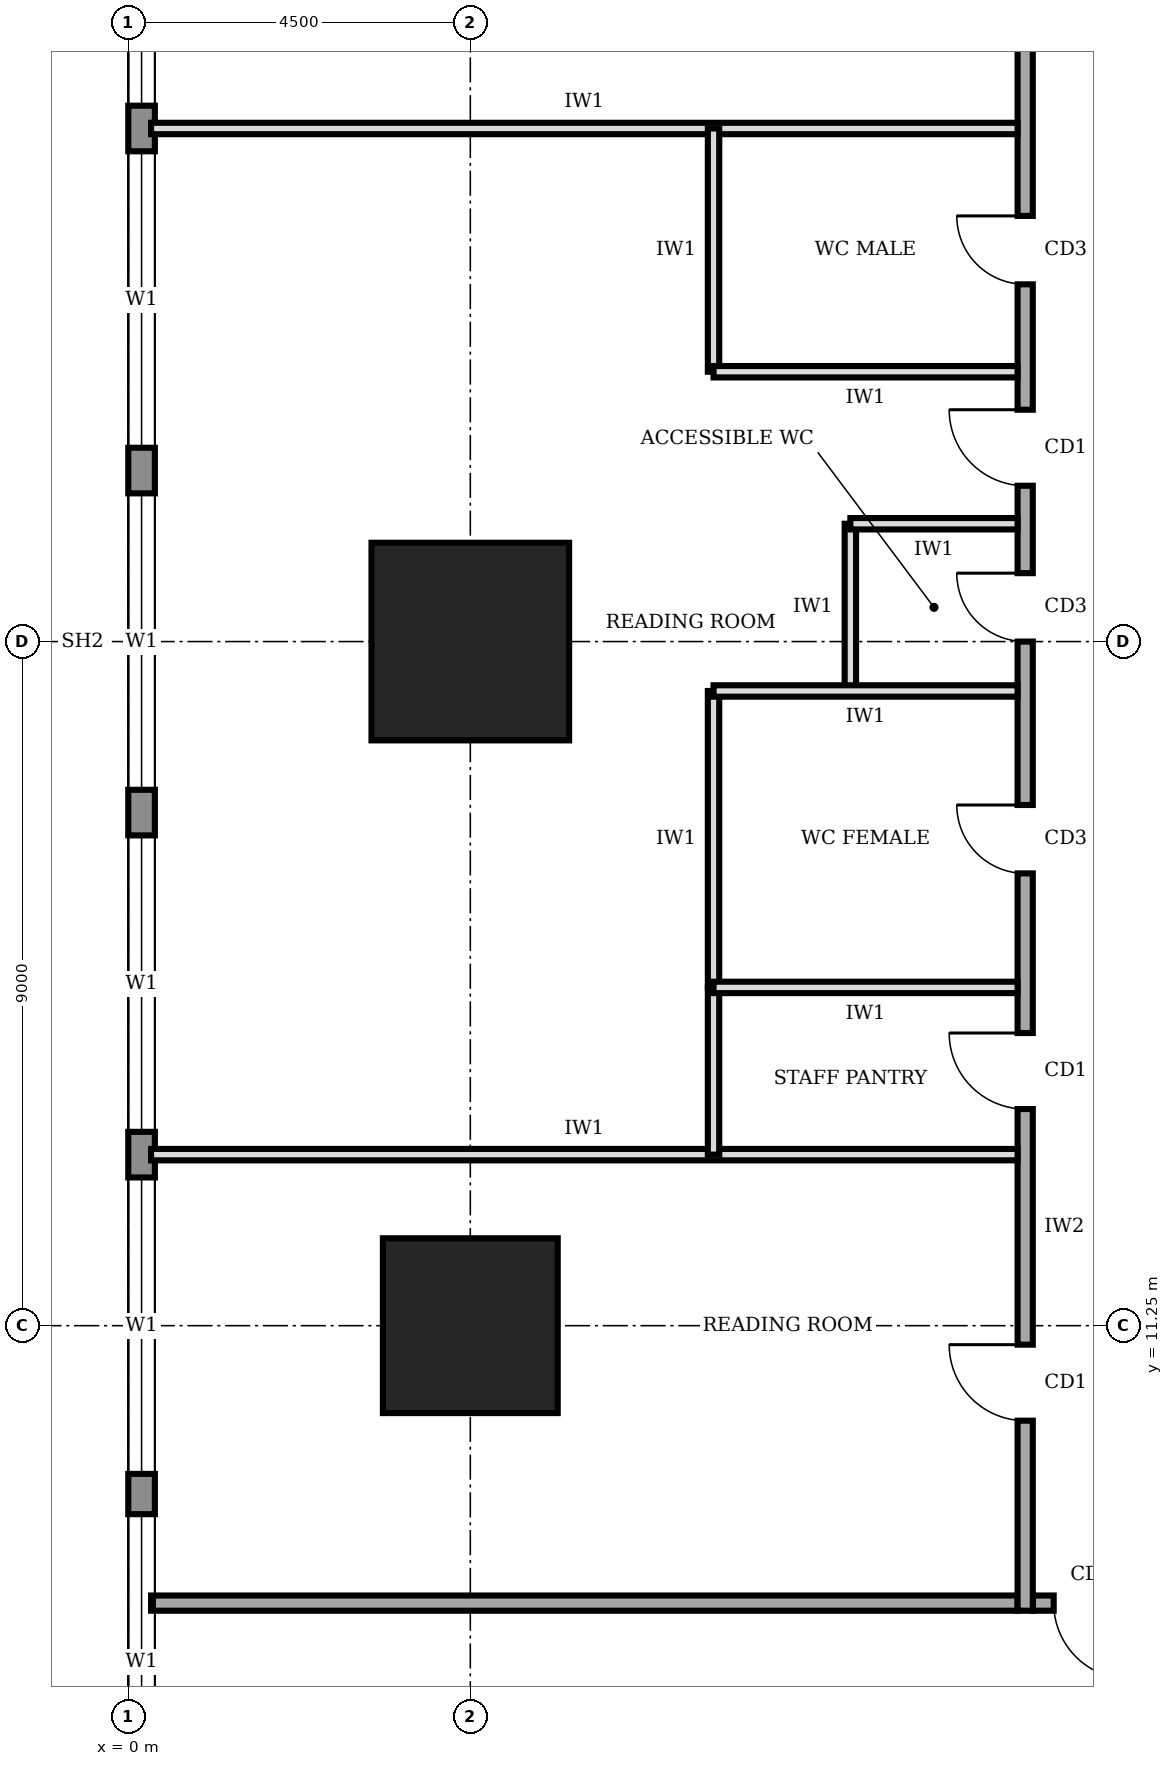
"""IFC4 building model, lengths in metres.
Left out: names, types, materials, properties, quantities, classifications, styles, units other than length and angle.
Written with IfcOpenShell. Run it as: python <this file> out.ifc"""

import sys

from ifc_helpers import new_model, si_unit, direction, frame, frame_2d, origin, origin_2d, place, context, subcontext, project, spatial, rectangle, extrude, element, fill, save


model = new_model("IFC4")
c1 = context("Model", 3, precision=1e-05, world=origin(), true_north=direction((0.0, 1.0)))
c2 = subcontext(c1, "Body", "Model", "MODEL_VIEW")
j1 = project(units=[si_unit("LENGTHUNIT", "METRE"), si_unit("PLANEANGLEUNIT", "RADIAN")], contexts=[c1])
p1 = place(None, origin())
s1 = spatial("IfcSite", under=j1, at=p1, CompositionType="ELEMENT")
p2 = place(p1, origin())
s2 = spatial("IfcBuilding", under=s1, at=p2, CompositionType="ELEMENT")
p3 = place(p2, frame((0.0, 0.0, 129.0)))
s3 = spatial("IfcBuildingStorey", under=s2, at=p3, CompositionType="ELEMENT", Elevation=129.0)
p4 = place(p3, frame((4.5, 11.25, 0.0), z_axis=(0.0, 0.0, 1.0), x_axis=(1.0, 0.0, 0.0)))
e1 = element("IfcColumn", 1, at=p4, inside=s3, PredefinedType="COLUMN", context=c2, shape_type="SweptSolid", body=[
    extrude(rectangle(XDim=2.3, YDim=2.3, at=origin_2d()), origin(), (0.0, 0.0, 1.0), 4.0),
])
p5 = place(p3, frame((4.5, 20.25, 0.0), z_axis=(0.0, 0.0, 1.0), x_axis=(1.0, 0.0, 0.0)))
e2 = element("IfcColumn", 2, at=p5, inside=s3, PredefinedType="COLUMN", context=c2, shape_type="SweptSolid", body=[
    extrude(rectangle(XDim=2.6, YDim=2.6, at=origin_2d()), origin(), (0.0, 0.0, 1.0), 4.0),
])
p6 = place(p3, frame((0.175, 35.98, 0.0), z_axis=(0.0, 0.0, 1.0), x_axis=(0.0, -1.0, 0.0)))
e3 = element("IfcWall", 3, at=p6, inside=s3, PredefinedType="STANDARD", context=c2, shape_type="SweptSolid", body=[
    extrude(rectangle(XDim=31.46, YDim=0.35, at=frame_2d((15.73, 0.0))), origin(), (0.0, 0.0, 1.0), 3.75),
])
p7 = place(p6, frame((27.21, 0.0, 0.9)))
e4 = element("IfcOpeningElement", 4, at=p7, cuts=e3, PredefinedType="OPENING", context=c2, shape_type="SweptSolid", body=[
    extrude(rectangle(XDim=3.9, YDim=2.2, at=frame_2d((1.95, 1.1))), frame((0.0, 0.185, 0.0), z_axis=(0.0, -1.0, 0.0), x_axis=(1.0, 0.0, 0.0)), (0.0, 0.0, 1.0), 0.37),
])
p8 = place(p6, frame((22.78, 0.0, 0.9)))
e5 = element("IfcOpeningElement", 5, at=p8, cuts=e3, PredefinedType="OPENING", context=c2, shape_type="SweptSolid", body=[
    extrude(rectangle(XDim=3.9, YDim=2.2, at=frame_2d((1.95, 1.1))), frame((0.0, 0.185, 0.0), z_axis=(0.0, -1.0, 0.0), x_axis=(1.0, 0.0, 0.0)), (0.0, 0.0, 1.0), 0.37),
])
p9 = place(p6, frame((18.28, 0.0, 0.9)))
e6 = element("IfcOpeningElement", 6, at=p9, cuts=e3, PredefinedType="OPENING", context=c2, shape_type="SweptSolid", body=[
    extrude(rectangle(XDim=3.9, YDim=2.2, at=frame_2d((1.95, 1.1))), frame((0.0, 0.185, 0.0), z_axis=(0.0, -1.0, 0.0), x_axis=(1.0, 0.0, 0.0)), (0.0, 0.0, 1.0), 0.37),
])
p10 = place(p6, frame((13.78, 0.0, 0.9)))
e7 = element("IfcOpeningElement", 7, at=p10, cuts=e3, PredefinedType="OPENING", context=c2, shape_type="SweptSolid", body=[
    extrude(rectangle(XDim=3.9, YDim=2.2, at=frame_2d((1.95, 1.1))), frame((0.0, 0.185, 0.0), z_axis=(0.0, -1.0, 0.0), x_axis=(1.0, 0.0, 0.0)), (0.0, 0.0, 1.0), 0.37),
])
p11 = place(p6, frame((9.28, 0.0, 0.9)))
e8 = element("IfcOpeningElement", 8, at=p11, cuts=e3, PredefinedType="OPENING", context=c2, shape_type="SweptSolid", body=[
    extrude(rectangle(XDim=3.9, YDim=2.2, at=frame_2d((1.95, 1.1))), frame((0.0, 0.185, 0.0), z_axis=(0.0, -1.0, 0.0), x_axis=(1.0, 0.0, 0.0)), (0.0, 0.0, 1.0), 0.37),
])
p12 = place(p6, frame((4.78, 0.0, 0.9)))
e9 = element("IfcOpeningElement", 9, at=p12, cuts=e3, PredefinedType="OPENING", context=c2, shape_type="SweptSolid", body=[
    extrude(rectangle(XDim=3.9, YDim=2.2, at=frame_2d((1.95, 1.1))), frame((0.0, 0.185, 0.0), z_axis=(0.0, -1.0, 0.0), x_axis=(1.0, 0.0, 0.0)), (0.0, 0.0, 1.0), 0.37),
])
p13 = place(p3, frame((11.9, 7.6, 0.0), z_axis=(0.0, 0.0, 1.0), x_axis=(1.0, 0.0, 0.0)))
e10 = element("IfcWall", 10, at=p13, inside=s3, PredefinedType="SOLIDWALL", context=c2, shape_type="SweptSolid", body=[
    extrude(rectangle(XDim=16.9, YDim=0.2, at=frame_2d((8.45, 0.0))), origin(), (0.0, 0.0, 1.0), 3.75),
])
p14 = place(p13, frame((0.275, 0.0, 0.0)))
e11 = element("IfcOpeningElement", 11, at=p14, cuts=e10, PredefinedType="OPENING", context=c2, shape_type="SweptSolid", body=[
    extrude(rectangle(XDim=1.0, YDim=2.1, at=frame_2d((0.5, 1.05))), frame((0.0, 0.11, 0.0), z_axis=(0.0, -1.0, 0.0), x_axis=(1.0, 0.0, 0.0)), (0.0, 0.0, 1.0), 0.22),
])
p15 = place(p13, frame((3.35, 0.0, 0.0)))
e12 = element("IfcOpeningElement", 12, at=p15, cuts=e10, PredefinedType="OPENING", context=c2, shape_type="SweptSolid", body=[
    extrude(rectangle(XDim=1.0, YDim=2.1, at=frame_2d((0.5, 1.05))), frame((0.0, 0.11, 0.0), z_axis=(0.0, -1.0, 0.0), x_axis=(1.0, 0.0, 0.0)), (0.0, 0.0, 1.0), 0.22),
])
p16 = place(p13, frame((10.1, 0.0, 0.0)))
e13 = element("IfcOpeningElement", 13, at=p16, cuts=e10, PredefinedType="OPENING", context=c2, shape_type="SweptSolid", body=[
    extrude(rectangle(XDim=1.0, YDim=2.1, at=frame_2d((0.5, 1.05))), frame((0.0, 0.11, 0.0), z_axis=(0.0, -1.0, 0.0), x_axis=(1.0, 0.0, 0.0)), (0.0, 0.0, 1.0), 0.22),
])
p17 = place(p13, frame((15.425, 0.0, 0.0)))
e14 = element("IfcOpeningElement", 14, at=p17, cuts=e10, PredefinedType="OPENING", context=c2, shape_type="SweptSolid", body=[
    extrude(rectangle(XDim=1.0, YDim=2.1, at=frame_2d((0.5, 1.05))), frame((0.0, 0.11, 0.0), z_axis=(0.0, -1.0, 0.0), x_axis=(1.0, 0.0, 0.0)), (0.0, 0.0, 1.0), 0.22),
])
p18 = place(p3, frame((11.8, 31.3, 0.0), z_axis=(0.0, 0.0, 1.0), x_axis=(0.0, -1.0, 0.0)))
e15 = element("IfcWall", 15, at=p18, inside=s3, PredefinedType="SOLIDWALL", context=c2, shape_type="SweptSolid", body=[
    extrude(rectangle(XDim=23.8, YDim=0.2, at=frame_2d((11.9, 0.0))), origin(), (0.0, 0.0, 1.0), 3.75),
])
p19 = place(p18, frame((20.3, 0.0, 0.0)))
e16 = element("IfcOpeningElement", 16, at=p19, cuts=e15, PredefinedType="OPENING", context=c2, shape_type="SweptSolid", body=[
    extrude(rectangle(XDim=1.0, YDim=2.1, at=frame_2d((0.5, 1.05))), frame((0.0, 0.11, 0.0), z_axis=(0.0, -1.0, 0.0), x_axis=(1.0, 0.0, 0.0)), (0.0, 0.0, 1.0), 0.22),
])
p20 = place(p18, frame((16.2, 0.0, 0.0)))
e17 = element("IfcOpeningElement", 17, at=p20, cuts=e15, PredefinedType="OPENING", context=c2, shape_type="SweptSolid", body=[
    extrude(rectangle(XDim=1.0, YDim=2.1, at=frame_2d((0.5, 1.05))), frame((0.0, 0.11, 0.0), z_axis=(0.0, -1.0, 0.0), x_axis=(1.0, 0.0, 0.0)), (0.0, 0.0, 1.0), 0.22),
])
p21 = place(p18, frame((13.2, 0.0, 0.0)))
e18 = element("IfcOpeningElement", 18, at=p21, cuts=e15, PredefinedType="OPENING", context=c2, shape_type="SweptSolid", body=[
    extrude(rectangle(XDim=0.9, YDim=2.1, at=frame_2d((0.45, 1.05))), frame((0.0, 0.11, 0.0), z_axis=(0.0, -1.0, 0.0), x_axis=(1.0, 0.0, 0.0)), (0.0, 0.0, 1.0), 0.22),
])
p22 = place(p18, frame((10.15, 0.0, 0.0)))
e19 = element("IfcOpeningElement", 19, at=p22, cuts=e15, PredefinedType="OPENING", context=c2, shape_type="SweptSolid", body=[
    extrude(rectangle(XDim=0.9, YDim=2.1, at=frame_2d((0.45, 1.05))), frame((0.0, 0.11, 0.0), z_axis=(0.0, -1.0, 0.0), x_axis=(1.0, 0.0, 0.0)), (0.0, 0.0, 1.0), 0.22),
])
p23 = place(p18, frame((5.45, 0.0, 0.0)))
e20 = element("IfcOpeningElement", 20, at=p23, cuts=e15, PredefinedType="OPENING", context=c2, shape_type="SweptSolid", body=[
    extrude(rectangle(XDim=0.9, YDim=2.1, at=frame_2d((0.45, 1.05))), frame((0.0, 0.11, 0.0), z_axis=(0.0, -1.0, 0.0), x_axis=(1.0, 0.0, 0.0)), (0.0, 0.0, 1.0), 0.22),
])
p24 = place(p18, frame((8.0, 0.0, 0.0)))
e21 = element("IfcOpeningElement", 21, at=p24, cuts=e15, PredefinedType="OPENING", context=c2, shape_type="SweptSolid", body=[
    extrude(rectangle(XDim=1.0, YDim=2.1, at=frame_2d((0.5, 1.05))), frame((0.0, 0.11, 0.0), z_axis=(0.0, -1.0, 0.0), x_axis=(1.0, 0.0, 0.0)), (0.0, 0.0, 1.0), 0.22),
])
p25 = place(p18, frame((1.55, 0.0, 0.0)))
e22 = element("IfcOpeningElement", 22, at=p25, cuts=e15, PredefinedType="OPENING", context=c2, shape_type="SweptSolid", body=[
    extrude(rectangle(XDim=1.0, YDim=2.1, at=frame_2d((0.5, 1.05))), frame((0.0, 0.11, 0.0), z_axis=(0.0, -1.0, 0.0), x_axis=(1.0, 0.0, 0.0)), (0.0, 0.0, 1.0), 0.22),
])
p26 = place(p3, frame((0.3, 7.6, 0.0), z_axis=(0.0, 0.0, 1.0), x_axis=(1.0, 0.0, 0.0)))
e23 = element("IfcWall", 23, at=p26, inside=s3, PredefinedType="SOLIDWALL", context=c2, shape_type="SweptSolid", body=[
    extrude(rectangle(XDim=11.4, YDim=0.2, at=frame_2d((5.7, 0.0))), origin(), (0.0, 0.0, 1.0), 3.75),
])
for number, where, z_axis, x_axis in (
    (24, (0.3, 13.5, 0.0), (0.0, 0.0, 1.0), (1.0, 0.0, 0.0)),
    (25, (0.3, 27.0, 0.0), (0.0, 0.0, 1.0), (1.0, 0.0, 0.0)),
):
    element("IfcWall", number, at=place(p3, frame(where, z_axis=z_axis, x_axis=x_axis)), inside=s3, PredefinedType="PARTITIONING", context=c2, shape_type="SweptSolid", body=[
        extrude(rectangle(XDim=11.4, YDim=0.15, at=frame_2d((5.7, 0.0))), origin(), (0.0, 0.0, 1.0), 3.75),
    ])
p27 = place(p3, frame((11.7, 15.7, 0.0), z_axis=(0.0, 0.0, 1.0), x_axis=(-1.0, 0.0, 0.0)))
e26 = element("IfcWall", 26, at=p27, inside=s3, PredefinedType="PARTITIONING", context=c2, shape_type="SweptSolid", body=[
    extrude(rectangle(XDim=4.0, YDim=0.15, at=frame_2d((2.0, 0.0))), origin(), (0.0, 0.0, 1.0), 3.75),
])
p28 = place(p3, frame((11.7, 19.6, 0.0), z_axis=(0.0, 0.0, 1.0), x_axis=(-1.0, 0.0, 0.0)))
e27 = element("IfcWall", 27, at=p28, inside=s3, PredefinedType="PARTITIONING", context=c2, shape_type="SweptSolid", body=[
    extrude(rectangle(XDim=4.0, YDim=0.15, at=frame_2d((2.0, 0.0))), origin(), (0.0, 0.0, 1.0), 2.85),
])
p29 = place(p3, frame((11.7, 21.8, 0.0), z_axis=(0.0, 0.0, 1.0), x_axis=(-1.0, 0.0, 0.0)))
e28 = element("IfcWall", 28, at=p29, inside=s3, PredefinedType="PARTITIONING", context=c2, shape_type="SweptSolid", body=[
    extrude(rectangle(XDim=2.2, YDim=0.15, at=frame_2d((1.1, 0.0))), origin(), (0.0, 0.0, 1.0), 3.75),
])
p30 = place(p3, frame((11.7, 23.8, 0.0), z_axis=(0.0, 0.0, 1.0), x_axis=(-1.0, 0.0, 0.0)))
e29 = element("IfcWall", 29, at=p30, inside=s3, PredefinedType="PARTITIONING", context=c2, shape_type="SweptSolid", body=[
    extrude(rectangle(XDim=4.0, YDim=0.15, at=frame_2d((2.0, 0.0))), origin(), (0.0, 0.0, 1.0), 3.75),
])
p31 = place(p3, frame((7.7, 13.5, 0.0), z_axis=(0.0, 0.0, 1.0), x_axis=(0.0, 1.0, 0.0)))
e30 = element("IfcWall", 30, at=p31, inside=s3, PredefinedType="PARTITIONING", context=c2, shape_type="SweptSolid", body=[
    extrude(rectangle(XDim=2.2, YDim=0.15, at=frame_2d((1.1, 0.0))), origin(), (0.0, 0.0, 1.0), 3.75),
])
p32 = place(p3, frame((7.7, 15.7, 0.0), z_axis=(0.0, 0.0, 1.0), x_axis=(0.0, 1.0, 0.0)))
e31 = element("IfcWall", 31, at=p32, inside=s3, PredefinedType="PARTITIONING", context=c2, shape_type="SweptSolid", body=[
    extrude(rectangle(XDim=3.9, YDim=0.15, at=frame_2d((1.95, 0.0))), origin(), (0.0, 0.0, 1.0), 3.75),
])
p33 = place(p3, frame((9.5, 19.6, 0.0), z_axis=(0.0, 0.0, 1.0), x_axis=(0.0, 1.0, 0.0)))
e32 = element("IfcWall", 32, at=p33, inside=s3, PredefinedType="PARTITIONING", context=c2, shape_type="SweptSolid", body=[
    extrude(rectangle(XDim=2.2, YDim=0.15, at=frame_2d((1.1, 0.0))), origin(), (0.0, 0.0, 1.0), 3.75),
])
p34 = place(p3, frame((7.7, 23.8, 0.0), z_axis=(0.0, 0.0, 1.0), x_axis=(0.0, 1.0, 0.0)))
e33 = element("IfcWall", 33, at=p34, inside=s3, PredefinedType="PARTITIONING", context=c2, shape_type="SweptSolid", body=[
    extrude(rectangle(XDim=3.2, YDim=0.15, at=frame_2d((1.6, 0.0))), origin(), (0.0, 0.0, 1.0), 3.75),
])
p35 = place(p7, origin())
e34 = element("IfcWindow", 34, at=p35, inside=s3, PartitioningType="SINGLE_PANEL", PredefinedType="WINDOW", context=c2, shape_type="SweptSolid", body=[
    extrude(rectangle(XDim=3.9, YDim=2.2, at=frame_2d((1.95, 1.1))), frame((0.0, 0.03, 0.0), z_axis=(0.0, -1.0, 0.0), x_axis=(1.0, 0.0, 0.0)), (0.0, 0.0, 1.0), 0.06),
])
fill(e4, e34)
p36 = place(p8, origin())
e35 = element("IfcWindow", 35, at=p36, inside=s3, PartitioningType="SINGLE_PANEL", PredefinedType="WINDOW", context=c2, shape_type="SweptSolid", body=[
    extrude(rectangle(XDim=3.9, YDim=2.2, at=frame_2d((1.95, 1.1))), frame((0.0, 0.03, 0.0), z_axis=(0.0, -1.0, 0.0), x_axis=(1.0, 0.0, 0.0)), (0.0, 0.0, 1.0), 0.06),
])
fill(e5, e35)
p37 = place(p9, origin())
e36 = element("IfcWindow", 36, at=p37, inside=s3, PartitioningType="SINGLE_PANEL", PredefinedType="WINDOW", context=c2, shape_type="SweptSolid", body=[
    extrude(rectangle(XDim=3.9, YDim=2.2, at=frame_2d((1.95, 1.1))), frame((0.0, 0.03, 0.0), z_axis=(0.0, -1.0, 0.0), x_axis=(1.0, 0.0, 0.0)), (0.0, 0.0, 1.0), 0.06),
])
fill(e6, e36)
p38 = place(p10, origin())
e37 = element("IfcWindow", 37, at=p38, inside=s3, PartitioningType="SINGLE_PANEL", PredefinedType="WINDOW", context=c2, shape_type="SweptSolid", body=[
    extrude(rectangle(XDim=3.9, YDim=2.2, at=frame_2d((1.95, 1.1))), frame((0.0, 0.03, 0.0), z_axis=(0.0, -1.0, 0.0), x_axis=(1.0, 0.0, 0.0)), (0.0, 0.0, 1.0), 0.06),
])
fill(e7, e37)
p39 = place(p11, origin())
e38 = element("IfcWindow", 38, at=p39, inside=s3, PartitioningType="SINGLE_PANEL", PredefinedType="WINDOW", context=c2, shape_type="SweptSolid", body=[
    extrude(rectangle(XDim=3.9, YDim=2.2, at=frame_2d((1.95, 1.1))), frame((0.0, 0.03, 0.0), z_axis=(0.0, -1.0, 0.0), x_axis=(1.0, 0.0, 0.0)), (0.0, 0.0, 1.0), 0.06),
])
fill(e8, e38)
p40 = place(p12, origin())
e39 = element("IfcWindow", 39, at=p40, inside=s3, PartitioningType="SINGLE_PANEL", PredefinedType="WINDOW", context=c2, shape_type="SweptSolid", body=[
    extrude(rectangle(XDim=3.9, YDim=2.2, at=frame_2d((1.95, 1.1))), frame((0.0, 0.03, 0.0), z_axis=(0.0, -1.0, 0.0), x_axis=(1.0, 0.0, 0.0)), (0.0, 0.0, 1.0), 0.06),
])
fill(e9, e39)
p41 = place(p14, frame((1.0, 0.0, 0.0), z_axis=(0.0, 0.0, 1.0), x_axis=(-1.0, 0.0, 0.0)))
e40 = element("IfcDoor", 40, at=p41, inside=s3, OperationType="SINGLE_SWING_LEFT", PredefinedType="DOOR", context=c2, shape_type="SweptSolid", body=[
    extrude(rectangle(XDim=1.0, YDim=2.1, at=frame_2d((0.5, 1.05))), frame((0.0, 0.025, 0.0), z_axis=(0.0, -1.0, 0.0), x_axis=(1.0, 0.0, 0.0)), (0.0, 0.0, 1.0), 0.05),
])
fill(e11, e40)
p42 = place(p19, frame((1.0, 0.0, 0.0), z_axis=(0.0, 0.0, 1.0), x_axis=(-1.0, 0.0, 0.0)))
e41 = element("IfcDoor", 41, at=p42, inside=s3, OperationType="SINGLE_SWING_RIGHT", PredefinedType="DOOR", context=c2, shape_type="SweptSolid", body=[
    extrude(rectangle(XDim=1.0, YDim=2.1, at=frame_2d((0.5, 1.05))), frame((0.0, 0.025, 0.0), z_axis=(0.0, -1.0, 0.0), x_axis=(1.0, 0.0, 0.0)), (0.0, 0.0, 1.0), 0.05),
])
fill(e16, e41)
p43 = place(p20, frame((1.0, 0.0, 0.0), z_axis=(0.0, 0.0, 1.0), x_axis=(-1.0, 0.0, 0.0)))
e42 = element("IfcDoor", 42, at=p43, inside=s3, OperationType="SINGLE_SWING_RIGHT", PredefinedType="DOOR", context=c2, shape_type="SweptSolid", body=[
    extrude(rectangle(XDim=1.0, YDim=2.1, at=frame_2d((0.5, 1.05))), frame((0.0, 0.025, 0.0), z_axis=(0.0, -1.0, 0.0), x_axis=(1.0, 0.0, 0.0)), (0.0, 0.0, 1.0), 0.05),
])
fill(e17, e42)
p44 = place(p21, frame((0.9, 0.0, 0.0), z_axis=(0.0, 0.0, 1.0), x_axis=(-1.0, 0.0, 0.0)))
e43 = element("IfcDoor", 43, at=p44, inside=s3, OperationType="SINGLE_SWING_RIGHT", PredefinedType="DOOR", context=c2, shape_type="SweptSolid", body=[
    extrude(rectangle(XDim=0.9, YDim=2.1, at=frame_2d((0.45, 1.05))), frame((0.0, 0.025, 0.0), z_axis=(0.0, -1.0, 0.0), x_axis=(1.0, 0.0, 0.0)), (0.0, 0.0, 1.0), 0.05),
])
fill(e18, e43)
p45 = place(p22, frame((0.9, 0.0, 0.0), z_axis=(0.0, 0.0, 1.0), x_axis=(-1.0, 0.0, 0.0)))
e44 = element("IfcDoor", 44, at=p45, inside=s3, OperationType="SINGLE_SWING_RIGHT", PredefinedType="DOOR", context=c2, shape_type="SweptSolid", body=[
    extrude(rectangle(XDim=0.9, YDim=2.1, at=frame_2d((0.45, 1.05))), frame((0.0, 0.025, 0.0), z_axis=(0.0, -1.0, 0.0), x_axis=(1.0, 0.0, 0.0)), (0.0, 0.0, 1.0), 0.05),
])
fill(e19, e44)
p46 = place(p23, frame((0.9, 0.0, 0.0), z_axis=(0.0, 0.0, 1.0), x_axis=(-1.0, 0.0, 0.0)))
e45 = element("IfcDoor", 45, at=p46, inside=s3, OperationType="SINGLE_SWING_RIGHT", PredefinedType="DOOR", context=c2, shape_type="SweptSolid", body=[
    extrude(rectangle(XDim=0.9, YDim=2.1, at=frame_2d((0.45, 1.05))), frame((0.0, 0.025, 0.0), z_axis=(0.0, -1.0, 0.0), x_axis=(1.0, 0.0, 0.0)), (0.0, 0.0, 1.0), 0.05),
])
fill(e20, e45)
p47 = place(p24, frame((1.0, 0.0, 0.0), z_axis=(0.0, 0.0, 1.0), x_axis=(-1.0, 0.0, 0.0)))
e46 = element("IfcDoor", 46, at=p47, inside=s3, OperationType="SINGLE_SWING_RIGHT", PredefinedType="DOOR", context=c2, shape_type="SweptSolid", body=[
    extrude(rectangle(XDim=1.0, YDim=2.1, at=frame_2d((0.5, 1.05))), frame((0.0, 0.025, 0.0), z_axis=(0.0, -1.0, 0.0), x_axis=(1.0, 0.0, 0.0)), (0.0, 0.0, 1.0), 0.05),
])
fill(e21, e46)
save(model, sys.argv[1])
